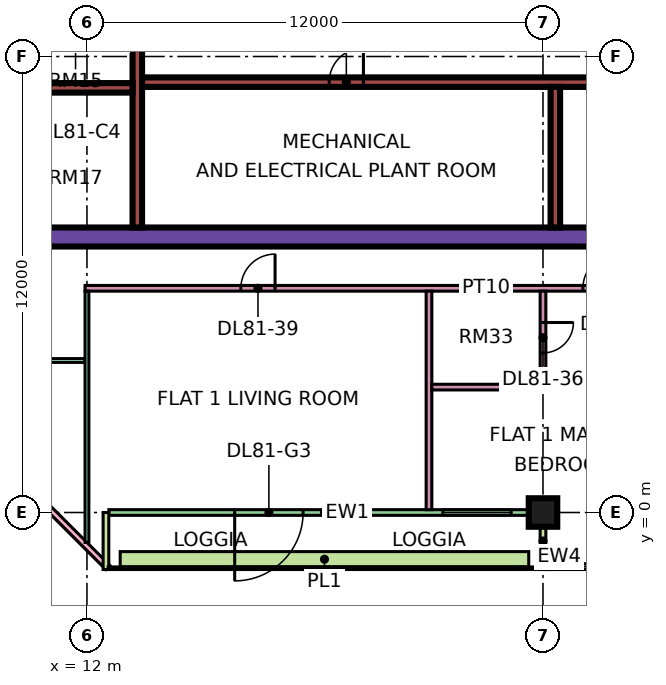
"""IFC4 building model, lengths in metres.
Left out: names, types, materials, properties, quantities, classifications, styles, units other than length and angle.
Written with IfcOpenShell. Run it as: python <this file> out.ifc"""

import sys

from ifc_helpers import new_model, si_unit, direction, frame, frame_2d, origin, origin_2d, place, context, subcontext, project, spatial, rectangle, extrude, element, fill, save


model = new_model("IFC4")
c1 = context("Model", 3, precision=1e-05, world=origin(), true_north=direction((0.0, 1.0)))
c2 = subcontext(c1, "Body", "Model", "MODEL_VIEW")
j1 = project(units=[si_unit("LENGTHUNIT", "METRE"), si_unit("PLANEANGLEUNIT", "RADIAN")], contexts=[c1])
p1 = place(None, origin())
s1 = spatial("IfcSite", under=j1, at=p1, CompositionType="ELEMENT")
p2 = place(p1, origin())
s2 = spatial("IfcBuilding", under=s1, at=p2, CompositionType="ELEMENT")
p3 = place(p2, frame((0.0, 0.0, 350.15)))
s3 = spatial("IfcBuildingStorey", under=s2, at=p3, CompositionType="ELEMENT", Elevation=350.15)
p4 = place(p3, frame((24.0, 0.0, 0.0), z_axis=(0.0, 0.0, 1.0), x_axis=(1.0, 0.0, 0.0)))
e1 = element("IfcColumn", 1, at=p4, inside=s3, PredefinedType="COLUMN", context=c2, shape_type="SweptSolid", body=[
    extrude(rectangle(XDim=0.75, YDim=0.75, at=origin_2d()), origin(), (0.0, 0.0, 1.0), 3.75),
])
p5 = place(p3, frame((9.0, 7.25, 0.0), z_axis=(0.0, 0.0, 1.0), x_axis=(1.0, 0.0, 0.0)))
e2 = element("IfcWall", 2, at=p5, inside=s3, PredefinedType="SHEAR", context=c2, shape_type="SweptSolid", body=[
    extrude(rectangle(XDim=25.0, YDim=0.5, at=frame_2d((12.5, 0.0))), origin(), (0.0, 0.0, 1.0), 3.75),
])
p6 = place(p3, frame((13.325, 7.5, 0.0), z_axis=(0.0, 0.0, 1.0), x_axis=(0.0, 1.0, 0.0)))
e3 = element("IfcWall", 3, at=p6, inside=s3, PredefinedType="SHEAR", context=c2, shape_type="SweptSolid", body=[
    extrude(rectangle(XDim=12.0, YDim=0.25, at=frame_2d((6.0, 0.0))), origin(), (0.0, 0.0, 1.0), 3.75),
])
p7 = place(p3, frame((13.45, 11.325, 0.0), z_axis=(0.0, 0.0, 1.0), x_axis=(1.0, 0.0, 0.0)))
e4 = element("IfcWall", 4, at=p7, inside=s3, PredefinedType="SHEAR", context=c2, shape_type="SweptSolid", body=[
    extrude(rectangle(XDim=20.05, YDim=0.25, at=frame_2d((10.025, 0.0))), origin(), (0.0, 0.0, 1.0), 3.75),
])
p8 = place(p7, frame((4.925, 0.0, 0.0)))
e5 = element("IfcOpeningElement", 5, at=p8, cuts=e4, PredefinedType="OPENING", context=c2, shape_type="SweptSolid", body=[
    extrude(rectangle(XDim=0.9, YDim=2.1, at=frame_2d((0.45, 1.05))), frame((0.0, 0.135, 0.0), z_axis=(0.0, -1.0, 0.0), x_axis=(1.0, 0.0, 0.0)), (0.0, 0.0, 1.0), 0.27),
])
p9 = place(p7, frame((12.3, 0.0, 0.0)))
e6 = element("IfcOpeningElement", 6, at=p9, cuts=e4, PredefinedType="OPENING", context=c2, shape_type="SweptSolid", body=[
    extrude(rectangle(XDim=0.9, YDim=2.1, at=frame_2d((0.45, 1.05))), frame((0.0, 0.135, 0.0), z_axis=(0.0, -1.0, 0.0), x_axis=(1.0, 0.0, 0.0)), (0.0, 0.0, 1.0), 0.27),
])
p10 = place(p7, frame((16.825, 0.0, 0.0)))
e7 = element("IfcOpeningElement", 7, at=p10, cuts=e4, PredefinedType="OPENING", context=c2, shape_type="SweptSolid", body=[
    extrude(rectangle(XDim=0.9, YDim=2.1, at=frame_2d((0.45, 1.05))), frame((0.0, 0.135, 0.0), z_axis=(0.0, -1.0, 0.0), x_axis=(1.0, 0.0, 0.0)), (0.0, 0.0, 1.0), 0.27),
])
p11 = place(p3, frame((10.2, 11.175, 0.0), z_axis=(0.0, 0.0, 1.0), x_axis=(1.0, 0.0, 0.0)))
e8 = element("IfcWall", 8, at=p11, inside=s3, PredefinedType="SHEAR", context=c2, shape_type="SweptSolid", body=[
    extrude(rectangle(XDim=3.0, YDim=0.25, at=frame_2d((1.5, 0.0))), origin(), (0.0, 0.0, 1.0), 3.75),
])
p12 = place(p3, frame((24.325, 7.5, 0.0), z_axis=(0.0, 0.0, 1.0), x_axis=(0.0, 1.0, 0.0)))
e9 = element("IfcWall", 9, at=p12, inside=s3, PredefinedType="SHEAR", context=c2, shape_type="SweptSolid", body=[
    extrude(rectangle(XDim=3.7, YDim=0.25, at=frame_2d((1.85, 0.0))), origin(), (0.0, 0.0, 1.0), 3.75),
])
p13 = place(p3, frame((-1.447, 12.553, 0.0), z_axis=(0.0, 0.0, 1.0), x_axis=(0.707106781187, -0.707106781187, 0.0)))
e10 = element("IfcWall", 10, at=p13, inside=s3, PredefinedType="SOLIDWALL", context=c2, shape_type="SweptSolid", body=[
    extrude(rectangle(XDim=19.799, YDim=0.15, at=frame_2d((9.899, 0.0))), origin(), (0.0, 0.0, 1.0), 3.35),
])
p14 = place(p13, frame((2.212, 0.0, 0.45)))
e11 = element("IfcOpeningElement", 11, at=p14, cuts=e10, PredefinedType="OPENING", context=c2, shape_type="SweptSolid", body=[
    extrude(rectangle(XDim=3.0, YDim=2.4, at=frame_2d((1.5, 1.2))), frame((0.0, 0.085, 0.0), z_axis=(0.0, -1.0, 0.0), x_axis=(1.0, 0.0, 0.0)), (0.0, 0.0, 1.0), 0.17),
])
p15 = place(p13, frame((10.216, 0.0, 0.45)))
e12 = element("IfcOpeningElement", 12, at=p15, cuts=e10, PredefinedType="OPENING", context=c2, shape_type="SweptSolid", body=[
    extrude(rectangle(XDim=3.0, YDim=2.4, at=frame_2d((1.5, 1.2))), frame((0.0, 0.085, 0.0), z_axis=(0.0, -1.0, 0.0), x_axis=(1.0, 0.0, 0.0)), (0.0, 0.0, 1.0), 0.17),
])
p16 = place(p3, frame((12.575, 0.0, 0.0), z_axis=(0.0, 0.0, 1.0), x_axis=(1.0, 0.0, 0.0)))
e13 = element("IfcWall", 13, at=p16, inside=s3, PredefinedType="SOLIDWALL", context=c2, shape_type="SweptSolid", body=[
    extrude(rectangle(XDim=11.35, YDim=0.15, at=frame_2d((5.675, 0.0))), origin(), (0.0, 0.0, 1.0), 3.35),
])
p17 = place(p16, frame((3.312, 0.0, 0.0)))
e14 = element("IfcOpeningElement", 14, at=p17, cuts=e13, PredefinedType="OPENING", context=c2, shape_type="SweptSolid", body=[
    extrude(rectangle(XDim=1.8, YDim=2.4, at=frame_2d((0.9, 1.2))), frame((0.0, 0.085, 0.0), z_axis=(0.0, -1.0, 0.0), x_axis=(1.0, 0.0, 0.0)), (0.0, 0.0, 1.0), 0.17),
])
p18 = place(p16, frame((8.788, 0.0, 0.45)))
e15 = element("IfcOpeningElement", 15, at=p18, cuts=e13, PredefinedType="OPENING", context=c2, shape_type="SweptSolid", body=[
    extrude(rectangle(XDim=1.8, YDim=2.4, at=frame_2d((0.9, 1.2))), frame((0.0, 0.085, 0.0), z_axis=(0.0, -1.0, 0.0), x_axis=(1.0, 0.0, 0.0)), (0.0, 0.0, 1.0), 0.17),
])
for number, where, z_axis, x_axis in (
    (16, (12.5, -1.5, 0.0), (0.0, 0.0, 1.0), (0.0, 1.0, 0.0)),
    (17, (24.0, -1.5, 0.0), (0.0, 0.0, 1.0), (0.0, 1.0, 0.0)),
):
    element("IfcWall", number, at=place(p3, frame(where, z_axis=z_axis, x_axis=x_axis)), inside=s3, PredefinedType="SOLIDWALL", context=c2, shape_type="SweptSolid", body=[
        extrude(rectangle(XDim=1.5, YDim=0.15, at=frame_2d((0.75, 0.0))), origin(), (0.0, 0.0, 1.0), 3.35),
    ])
p19 = place(p3, frame((24.075, -1.425, 0.0), z_axis=(0.0, 0.0, 1.0), x_axis=(1.0, 0.0, 0.0)))
e18 = element("IfcWall", 18, at=p19, inside=s3, PredefinedType="SOLIDWALL", context=c2, shape_type="SweptSolid", body=[
    extrude(rectangle(XDim=11.85, YDim=0.15, at=frame_2d((5.925, 0.0))), origin(), (0.0, 0.0, 1.0), 3.35),
])
p20 = place(p19, frame((0.562, 0.0, 0.45)))
e19 = element("IfcOpeningElement", 19, at=p20, cuts=e18, PredefinedType="OPENING", context=c2, shape_type="SweptSolid", body=[
    extrude(rectangle(XDim=1.8, YDim=2.4, at=frame_2d((0.9, 1.2))), frame((0.0, 0.085, 0.0), z_axis=(0.0, -1.0, 0.0), x_axis=(1.0, 0.0, 0.0)), (0.0, 0.0, 1.0), 0.17),
])
p21 = place(p19, frame((3.525, 0.0, 0.45)))
e20 = element("IfcOpeningElement", 20, at=p21, cuts=e18, PredefinedType="OPENING", context=c2, shape_type="SweptSolid", body=[
    extrude(rectangle(XDim=1.8, YDim=2.4, at=frame_2d((0.9, 1.2))), frame((0.0, 0.085, 0.0), z_axis=(0.0, -1.0, 0.0), x_axis=(1.0, 0.0, 0.0)), (0.0, 0.0, 1.0), 0.17),
])
p22 = place(p19, frame((6.525, 0.0, 0.45)))
e21 = element("IfcOpeningElement", 21, at=p22, cuts=e18, PredefinedType="OPENING", context=c2, shape_type="SweptSolid", body=[
    extrude(rectangle(XDim=1.8, YDim=2.4, at=frame_2d((0.9, 1.2))), frame((0.0, 0.085, 0.0), z_axis=(0.0, -1.0, 0.0), x_axis=(1.0, 0.0, 0.0)), (0.0, 0.0, 1.0), 0.17),
])
p23 = place(p19, frame((9.488, 0.0, 0.45)))
e22 = element("IfcOpeningElement", 22, at=p23, cuts=e18, PredefinedType="OPENING", context=c2, shape_type="SweptSolid", body=[
    extrude(rectangle(XDim=1.8, YDim=2.4, at=frame_2d((0.9, 1.2))), frame((0.0, 0.085, 0.0), z_axis=(0.0, -1.0, 0.0), x_axis=(1.0, 0.0, 0.0)), (0.0, 0.0, 1.0), 0.17),
])
p24 = place(p3, frame((12.875, -1.229, 0.0), z_axis=(0.0, 0.0, 1.0), x_axis=(1.0, 0.0, 0.0)))
e23 = element("IfcWall", 23, at=p24, inside=s3, PredefinedType="SOLIDWALL", context=c2, shape_type="SweptSolid", body=[
    extrude(rectangle(XDim=10.75, YDim=0.4, at=frame_2d((5.375, 0.0))), origin(), (0.0, 0.0, 1.0), 0.7),
])
p25 = place(p3, frame((9.05, 4.0, 0.0), z_axis=(0.0, 0.0, 1.0), x_axis=(1.0, 0.0, 0.0)))
e24 = element("IfcWall", 24, at=p25, inside=s3, PredefinedType="PARTITIONING", context=c2, shape_type="SweptSolid", body=[
    extrude(rectangle(XDim=2.9, YDim=0.1, at=frame_2d((1.45, 0.0))), origin(), (0.0, 0.0, 1.0), 3.35),
])
p26 = place(p3, frame((11.95, 5.9, 0.0), z_axis=(0.0, 0.0, 1.0), x_axis=(1.0, 0.0, 0.0)))
e25 = element("IfcWall", 25, at=p26, inside=s3, PredefinedType="PARTITIONING", context=c2, shape_type="SweptSolid", body=[
    extrude(rectangle(XDim=21.1, YDim=0.15, at=frame_2d((10.55, 0.0))), origin(), (0.0, 0.0, 1.0), 3.35),
])
p27 = place(p26, frame((16.1, 0.0, 0.0)))
e26 = element("IfcOpeningElement", 26, at=p27, cuts=e25, PredefinedType="OPENING", context=c2, shape_type="SweptSolid", body=[
    extrude(rectangle(XDim=0.9, YDim=2.1, at=frame_2d((0.45, 1.05))), frame((0.0, 0.085, 0.0), z_axis=(0.0, -1.0, 0.0), x_axis=(1.0, 0.0, 0.0)), (0.0, 0.0, 1.0), 0.17),
])
p28 = place(p26, frame((13.1, 0.0, 0.0)))
e27 = element("IfcOpeningElement", 27, at=p28, cuts=e25, PredefinedType="OPENING", context=c2, shape_type="SweptSolid", body=[
    extrude(rectangle(XDim=0.9, YDim=2.1, at=frame_2d((0.45, 1.05))), frame((0.0, 0.085, 0.0), z_axis=(0.0, -1.0, 0.0), x_axis=(1.0, 0.0, 0.0)), (0.0, 0.0, 1.0), 0.17),
])
p29 = place(p26, frame((4.1, 0.0, 0.0)))
e28 = element("IfcOpeningElement", 28, at=p29, cuts=e25, PredefinedType="OPENING", context=c2, shape_type="SweptSolid", body=[
    extrude(rectangle(XDim=0.9, YDim=2.1, at=frame_2d((0.45, 1.05))), frame((0.0, 0.085, 0.0), z_axis=(0.0, -1.0, 0.0), x_axis=(1.0, 0.0, 0.0)), (0.0, 0.0, 1.0), 0.17),
])
p30 = place(p3, frame((12.0, -0.788, 0.0), z_axis=(0.0, 0.0, 1.0), x_axis=(0.0, 1.0, 0.0)))
e29 = element("IfcWall", 29, at=p30, inside=s3, PredefinedType="PARTITIONING", context=c2, shape_type="SweptSolid", body=[
    extrude(rectangle(XDim=6.613, YDim=0.1, at=frame_2d((3.306, 0.0))), origin(), (0.0, 0.0, 1.0), 3.35),
])
p31 = place(p3, frame((21.0, 0.074, 0.0), z_axis=(0.0, 0.0, 1.0), x_axis=(0.0, 1.0, 0.0)))
e30 = element("IfcWall", 30, at=p31, inside=s3, PredefinedType="PARTITIONING", context=c2, shape_type="SweptSolid", body=[
    extrude(rectangle(XDim=5.751, YDim=0.15, at=frame_2d((2.875, 0.0))), origin(), (0.0, 0.0, 1.0), 3.35),
])
p32 = place(p3, frame((21.075, 3.3, 0.0), z_axis=(0.0, 0.0, 1.0), x_axis=(1.0, 0.0, 0.0)))
e31 = element("IfcWall", 31, at=p32, inside=s3, PredefinedType="PARTITIONING", context=c2, shape_type="SweptSolid", body=[
    extrude(rectangle(XDim=3.0, YDim=0.15, at=frame_2d((1.5, 0.0))), origin(), (0.0, 0.0, 1.0), 3.35),
])
p33 = place(p3, frame((24.0, 3.375, 0.0), z_axis=(0.0, 0.0, 1.0), x_axis=(0.0, 1.0, 0.0)))
e32 = element("IfcWall", 32, at=p33, inside=s3, PredefinedType="PARTITIONING", context=c2, shape_type="SweptSolid", body=[
    extrude(rectangle(XDim=2.45, YDim=0.15, at=frame_2d((1.225, 0.0))), origin(), (0.0, 0.0, 1.0), 3.35),
])
p34 = place(p33, frame((0.825, 0.0, 0.0)))
e33 = element("IfcOpeningElement", 33, at=p34, cuts=e32, PredefinedType="OPENING", context=c2, shape_type="SweptSolid", body=[
    extrude(rectangle(XDim=0.8, YDim=2.1, at=frame_2d((0.4, 1.05))), frame((0.0, 0.085, 0.0), z_axis=(0.0, -1.0, 0.0), x_axis=(1.0, 0.0, 0.0)), (0.0, 0.0, 1.0), 0.17),
])
p35 = place(p17, frame((1.8, 0.0, 0.0), z_axis=(0.0, 0.0, 1.0), x_axis=(-1.0, 0.0, 0.0)))
e34 = element("IfcDoor", 34, at=p35, inside=s3, OperationType="DOUBLE_DOOR_SINGLE_SWING", PredefinedType="DOOR", context=c2, shape_type="SweptSolid", body=[
    extrude(rectangle(XDim=1.8, YDim=2.4, at=frame_2d((0.9, 1.2))), frame((0.0, 0.025, 0.0), z_axis=(0.0, -1.0, 0.0), x_axis=(1.0, 0.0, 0.0)), (0.0, 0.0, 1.0), 0.05),
])
fill(e14, e34)
p36 = place(p18, origin())
e35 = element("IfcWindow", 35, at=p36, inside=s3, PartitioningType="SINGLE_PANEL", PredefinedType="WINDOW", context=c2, shape_type="SweptSolid", body=[
    extrude(rectangle(XDim=1.8, YDim=2.4, at=frame_2d((0.9, 1.2))), frame((0.0, 0.03, 0.0), z_axis=(0.0, -1.0, 0.0), x_axis=(1.0, 0.0, 0.0)), (0.0, 0.0, 1.0), 0.06),
])
fill(e15, e35)
p37 = place(p20, origin())
e36 = element("IfcWindow", 36, at=p37, inside=s3, PartitioningType="SINGLE_PANEL", PredefinedType="WINDOW", context=c2, shape_type="SweptSolid", body=[
    extrude(rectangle(XDim=1.8, YDim=2.4, at=frame_2d((0.9, 1.2))), frame((0.0, 0.03, 0.0), z_axis=(0.0, -1.0, 0.0), x_axis=(1.0, 0.0, 0.0)), (0.0, 0.0, 1.0), 0.06),
])
fill(e19, e36)
p38 = place(p8, frame((0.9, 0.0, 0.0), z_axis=(0.0, 0.0, 1.0), x_axis=(-1.0, 0.0, 0.0)))
e37 = element("IfcDoor", 37, at=p38, inside=s3, OperationType="SINGLE_SWING_RIGHT", PredefinedType="DOOR", context=c2, shape_type="SweptSolid", body=[
    extrude(rectangle(XDim=0.9, YDim=2.1, at=frame_2d((0.45, 1.05))), frame((0.0, 0.025, 0.0), z_axis=(0.0, -1.0, 0.0), x_axis=(1.0, 0.0, 0.0)), (0.0, 0.0, 1.0), 0.05),
])
fill(e5, e37)
p39 = place(p28, frame((0.9, 0.0, 0.0), z_axis=(0.0, 0.0, 1.0), x_axis=(-1.0, 0.0, 0.0)))
e38 = element("IfcDoor", 38, at=p39, inside=s3, OperationType="SINGLE_SWING_RIGHT", PredefinedType="DOOR", context=c2, shape_type="SweptSolid", body=[
    extrude(rectangle(XDim=0.9, YDim=2.1, at=frame_2d((0.45, 1.05))), frame((0.0, 0.025, 0.0), z_axis=(0.0, -1.0, 0.0), x_axis=(1.0, 0.0, 0.0)), (0.0, 0.0, 1.0), 0.05),
])
fill(e27, e38)
p40 = place(p34, origin())
e39 = element("IfcDoor", 39, at=p40, inside=s3, OperationType="SINGLE_SWING_RIGHT", PredefinedType="DOOR", context=c2, shape_type="SweptSolid", body=[
    extrude(rectangle(XDim=0.8, YDim=2.1, at=frame_2d((0.4, 1.05))), frame((0.0, 0.025, 0.0), z_axis=(0.0, -1.0, 0.0), x_axis=(1.0, 0.0, 0.0)), (0.0, 0.0, 1.0), 0.05),
])
fill(e33, e39)
p41 = place(p29, frame((0.9, 0.0, 0.0), z_axis=(0.0, 0.0, 1.0), x_axis=(-1.0, 0.0, 0.0)))
e40 = element("IfcDoor", 40, at=p41, inside=s3, OperationType="SINGLE_SWING_RIGHT", PredefinedType="DOOR", context=c2, shape_type="SweptSolid", body=[
    extrude(rectangle(XDim=0.9, YDim=2.1, at=frame_2d((0.45, 1.05))), frame((0.0, 0.025, 0.0), z_axis=(0.0, -1.0, 0.0), x_axis=(1.0, 0.0, 0.0)), (0.0, 0.0, 1.0), 0.05),
])
fill(e28, e40)
save(model, sys.argv[1])
